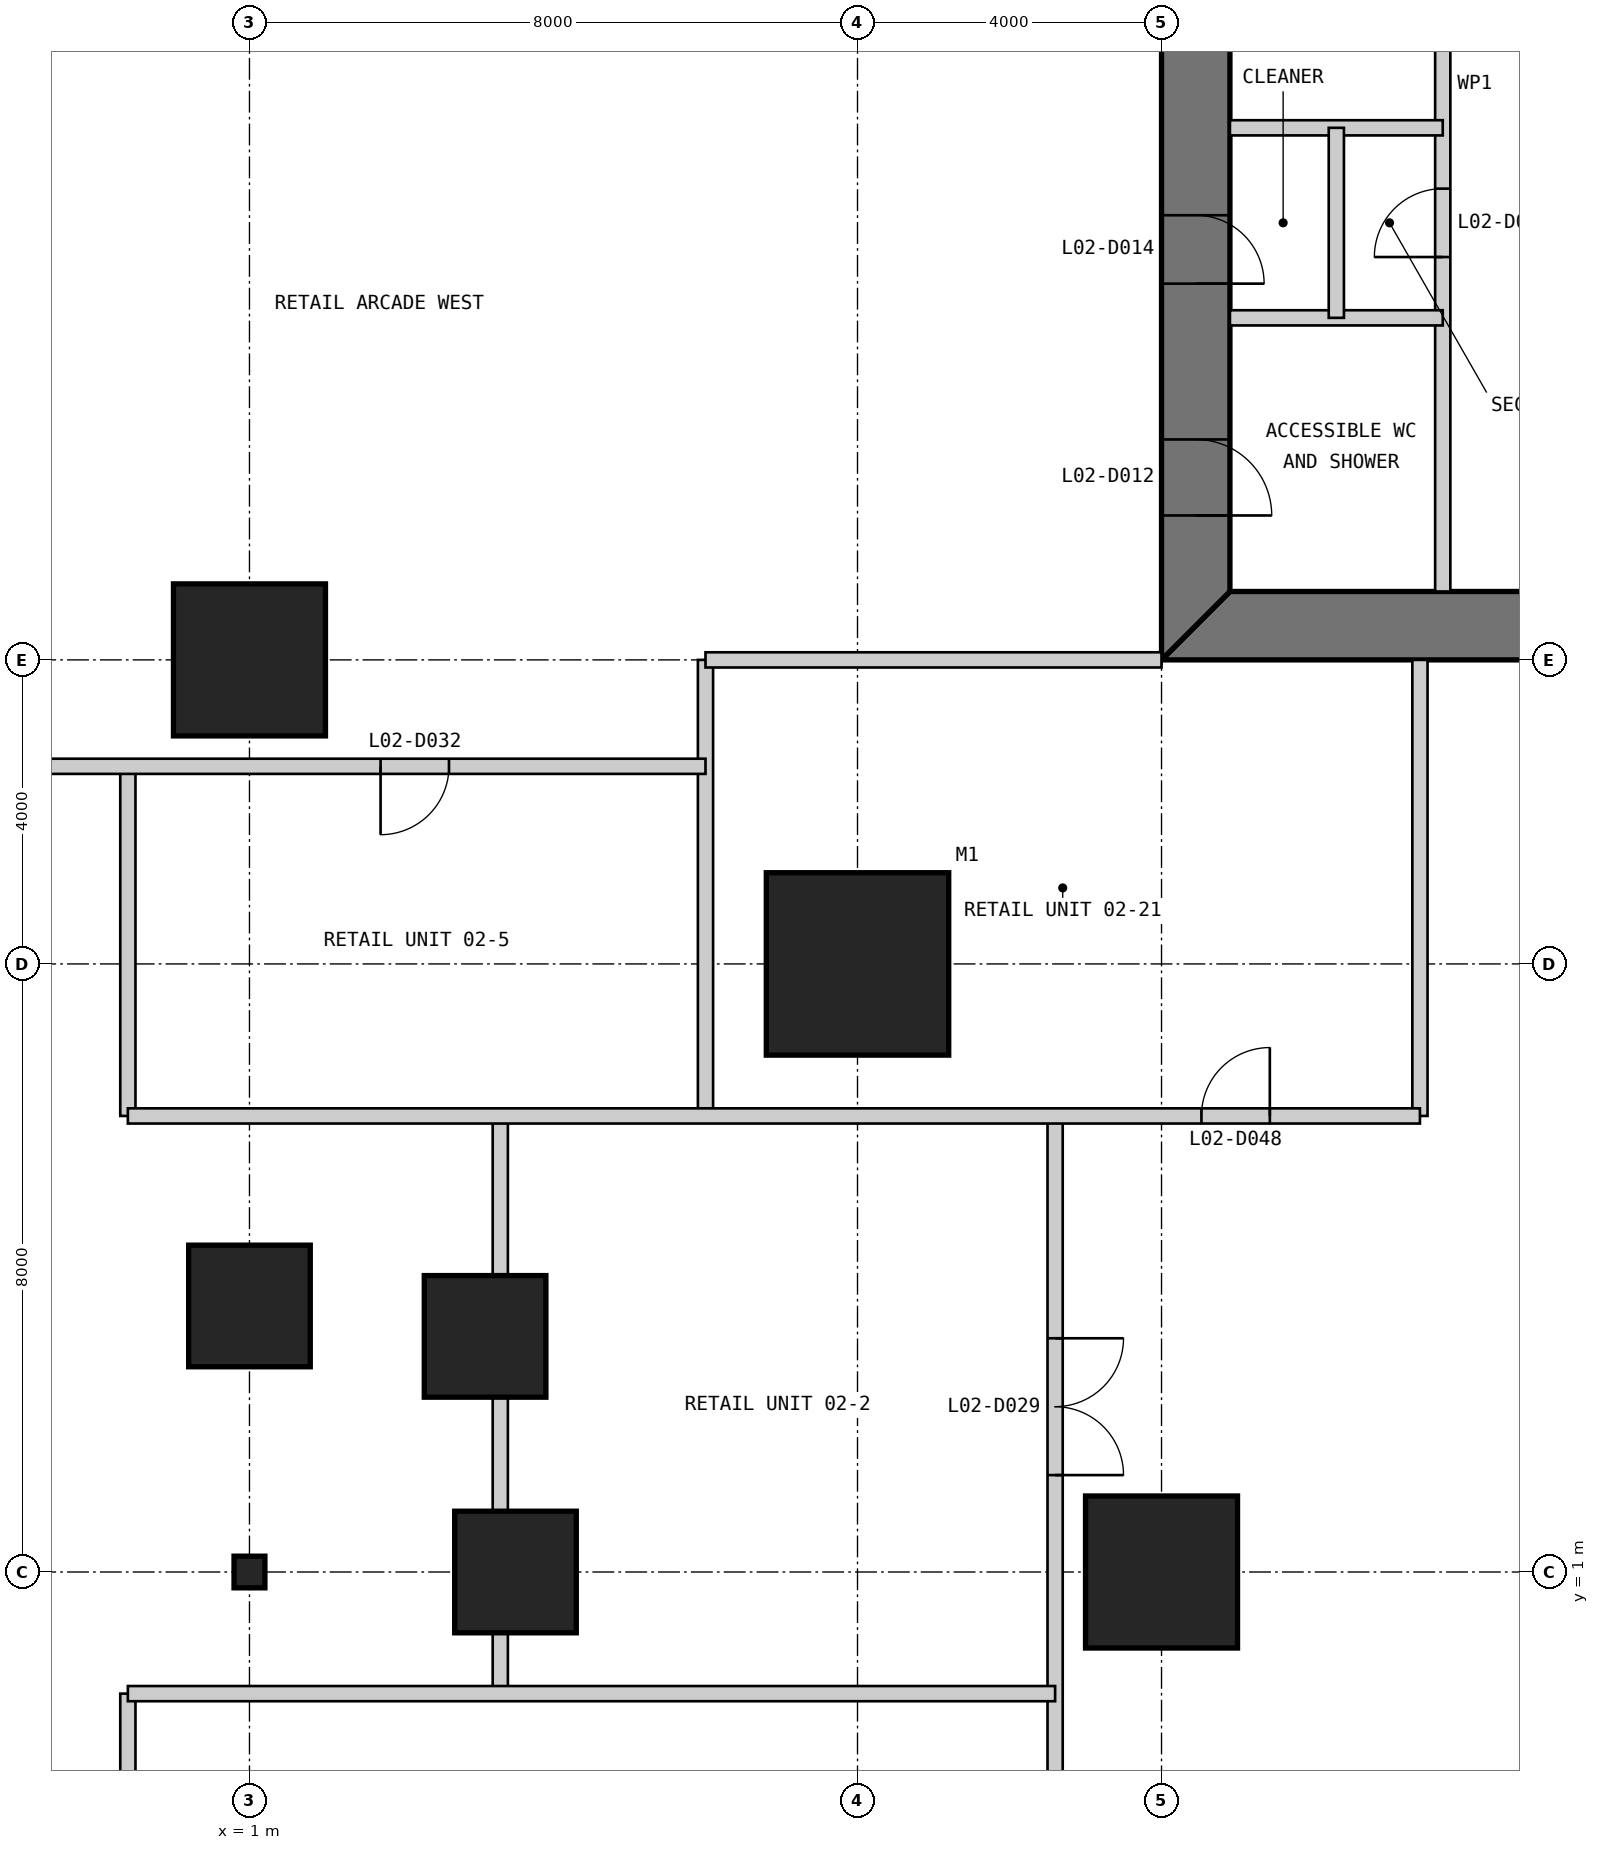
"""IFC4 building model, lengths in metres.
Left out: names, types, materials, properties, quantities, classifications, styles, units other than length and angle.
Written with IfcOpenShell. Run it as: python <this file> out.ifc"""

import sys

from ifc_helpers import new_model, si_unit, direction, frame, frame_2d, origin, origin_2d, place, context, subcontext, project, spatial, polyline, rectangle, i_section, outline, extrude, element, fill, save


model = new_model("IFC4")
c1 = context("Model", 3, precision=1e-05, world=origin(), true_north=direction((0.0, 1.0)))
c2 = subcontext(c1, "Body", "Model", "MODEL_VIEW")
j1 = project(units=[si_unit("LENGTHUNIT", "METRE"), si_unit("PLANEANGLEUNIT", "RADIAN")], contexts=[c1])
p1 = place(None, origin())
s1 = spatial("IfcSite", under=j1, at=p1, CompositionType="ELEMENT")
p2 = place(p1, origin())
s2 = spatial("IfcBuilding", under=s1, at=p2, CompositionType="ELEMENT")
p3 = place(p2, frame((0.0, 0.0, 11.8)))
s3 = spatial("IfcBuildingStorey", under=s2, at=p3, CompositionType="ELEMENT", Elevation=11.8)
p4 = place(p3, frame((9.0, 9.0, 0.0), z_axis=(0.0, 0.0, 1.0), x_axis=(1.0, 0.0, 0.0)))
e1 = element("IfcColumn", 1, at=p4, inside=s3, PredefinedType="COLUMN", context=c2, shape_type="SweptSolid", body=[
    extrude(rectangle(XDim=2.4, YDim=2.4, at=origin_2d()), origin(), (0.0, 0.0, 1.0), 4.8),
])
p5 = place(p3, frame((4.5, 1.0, 0.0), z_axis=(0.0, 0.0, 1.0), x_axis=(1.0, 0.0, 0.0)))
e2 = element("IfcColumn", 2, at=p5, inside=s3, PredefinedType="COLUMN", context=c2, shape_type="SweptSolid", body=[
    extrude(rectangle(XDim=1.6, YDim=1.6, at=origin_2d()), origin(), (0.0, 0.0, 1.0), 4.8),
])
for number, where, z_axis, x_axis in (
    (3, (13.0, 1.0, 0.0), (0.0, 0.0, 1.0), (1.0, 0.0, 0.0)),
    (4, (1.0, 13.0, 0.0), (0.0, 0.0, 1.0), (1.0, 0.0, 0.0)),
):
    element("IfcColumn", number, at=place(p3, frame(where, z_axis=z_axis, x_axis=x_axis)), inside=s3, PredefinedType="COLUMN", context=c2, shape_type="SweptSolid", body=[
        extrude(rectangle(XDim=2.0, YDim=2.0, at=origin_2d()), origin(), (0.0, 0.0, 1.0), 4.8),
    ])
for number, where, z_axis, x_axis in (
    (5, (1.0, 4.5, 0.0), (0.0, 0.0, 1.0), (1.0, 0.0, 0.0)),
    (6, (4.1, 4.1, 0.0), (0.0, 0.0, 1.0), (1.0, 0.0, 0.0)),
):
    element("IfcColumn", number, at=place(p3, frame(where, z_axis=z_axis, x_axis=x_axis)), inside=s3, PredefinedType="COLUMN", context=c2, shape_type="SweptSolid", body=[
        extrude(rectangle(XDim=1.6, YDim=1.6, at=origin_2d()), origin(), (0.0, 0.0, 1.0), 4.8),
    ])
p6 = place(p3, frame((1.0, 1.0, 0.0), z_axis=(0.0, 0.0, 1.0), x_axis=(1.0, 0.0, 0.0)))
e7 = element("IfcColumn", 7, at=p6, inside=s3, PredefinedType="COLUMN", context=c2, shape_type="SweptSolid", body=[
    extrude(i_section(OverallWidth=0.406, OverallDepth=0.417, WebThickness=0.03, FlangeThickness=0.048, at=origin_2d()), origin(), (0.0, 0.0, 1.0), 4.8),
])
p7 = place(p3, frame((13.0, 13.45, 0.0), z_axis=(0.0, 0.0, 1.0), x_axis=(1.0, 0.0, 0.0)))
e8 = element("IfcWall", 8, at=p7, inside=s3, PredefinedType="SHEAR", context=c2, shape_type="SweptSolid", body=[
    extrude(outline(polyline([(0.0, -0.45), (24.0, -0.45), (23.1, 0.45), (0.9, 0.45), (0.0, -0.45)])), origin(), (0.0, 0.0, 1.0), 4.8),
])
p8 = place(p7, frame((4.9, 0.0, 0.0)))
e9 = element("IfcOpeningElement", 9, at=p8, cuts=e8, PredefinedType="OPENING", context=c2, shape_type="SweptSolid", body=[
    extrude(rectangle(XDim=1.0, YDim=2.2, at=frame_2d((0.5, 1.1))), frame((0.0, 0.46, 0.0), z_axis=(0.0, -1.0, 0.0), x_axis=(1.0, 0.0, 0.0)), (0.0, 0.0, 1.0), 0.92),
])
p9 = place(p7, frame((8.9, 0.0, 0.0)))
e10 = element("IfcOpeningElement", 10, at=p9, cuts=e8, PredefinedType="OPENING", context=c2, shape_type="SweptSolid", body=[
    extrude(rectangle(XDim=1.1, YDim=2.2, at=frame_2d((0.55, 1.1))), frame((0.0, 0.46, 0.0), z_axis=(0.0, -1.0, 0.0), x_axis=(1.0, 0.0, 0.0)), (0.0, 0.0, 1.0), 0.92),
])
p10 = place(p7, frame((15.05, 0.0, 0.0)))
e11 = element("IfcOpeningElement", 11, at=p10, cuts=e8, PredefinedType="OPENING", context=c2, shape_type="SweptSolid", body=[
    extrude(rectangle(XDim=0.9, YDim=2.2, at=frame_2d((0.45, 1.1))), frame((0.0, 0.46, 0.0), z_axis=(0.0, -1.0, 0.0), x_axis=(1.0, 0.0, 0.0)), (0.0, 0.0, 1.0), 0.92),
])
p11 = place(p7, frame((17.9, 0.0, 0.0)))
e12 = element("IfcOpeningElement", 12, at=p11, cuts=e8, PredefinedType="OPENING", context=c2, shape_type="SweptSolid", body=[
    extrude(rectangle(XDim=1.0, YDim=2.2, at=frame_2d((0.5, 1.1))), frame((0.0, 0.46, 0.0), z_axis=(0.0, -1.0, 0.0), x_axis=(1.0, 0.0, 0.0)), (0.0, 0.0, 1.0), 0.92),
])
p12 = place(p7, frame((21.4, 0.0, 0.0)))
e13 = element("IfcOpeningElement", 13, at=p12, cuts=e8, PredefinedType="OPENING", context=c2, shape_type="SweptSolid", body=[
    extrude(rectangle(XDim=1.0, YDim=2.2, at=frame_2d((0.5, 1.1))), frame((0.0, 0.46, 0.0), z_axis=(0.0, -1.0, 0.0), x_axis=(1.0, 0.0, 0.0)), (0.0, 0.0, 1.0), 0.92),
])
p13 = place(p3, frame((13.45, 36.1, 0.0), z_axis=(0.0, 0.0, 1.0), x_axis=(0.0, -1.0, 0.0)))
e14 = element("IfcWall", 14, at=p13, inside=s3, PredefinedType="SHEAR", context=c2, shape_type="SweptSolid", body=[
    extrude(outline(polyline([(-0.9, -0.45), (23.1, -0.45), (22.2, 0.45), (0.0, 0.45), (-0.9, -0.45)])), origin(), (0.0, 0.0, 1.0), 4.8),
])
p14 = place(p13, frame((20.2, 0.0, 0.0)))
e15 = element("IfcOpeningElement", 15, at=p14, cuts=e14, PredefinedType="OPENING", context=c2, shape_type="SweptSolid", body=[
    extrude(rectangle(XDim=1.0, YDim=2.2, at=frame_2d((0.5, 1.1))), frame((0.0, 0.46, 0.0), z_axis=(0.0, -1.0, 0.0), x_axis=(1.0, 0.0, 0.0)), (0.0, 0.0, 1.0), 0.92),
])
p15 = place(p13, frame((17.25, 0.0, 0.0)))
e16 = element("IfcOpeningElement", 16, at=p15, cuts=e14, PredefinedType="OPENING", context=c2, shape_type="SweptSolid", body=[
    extrude(rectangle(XDim=0.9, YDim=2.2, at=frame_2d((0.45, 1.1))), frame((0.0, 0.46, 0.0), z_axis=(0.0, -1.0, 0.0), x_axis=(1.0, 0.0, 0.0)), (0.0, 0.0, 1.0), 0.92),
])
p16 = place(p3, frame((16.7, 13.9, 0.0), z_axis=(0.0, 0.0, 1.0), x_axis=(0.0, 1.0, 0.0)))
e17 = element("IfcWall", 17, at=p16, inside=s3, PredefinedType="PARTITIONING", context=c2, shape_type="SweptSolid", body=[
    extrude(rectangle(XDim=16.1, YDim=0.2, at=frame_2d((8.05, 0.0))), origin(), (0.0, 0.0, 1.0), 4.6),
])
p17 = place(p16, frame((4.4, 0.0, 0.0)))
e18 = element("IfcOpeningElement", 18, at=p17, cuts=e17, PredefinedType="OPENING", context=c2, shape_type="SweptSolid", body=[
    extrude(rectangle(XDim=0.9, YDim=2.2, at=frame_2d((0.45, 1.1))), frame((0.0, 0.11, 0.0), z_axis=(0.0, -1.0, 0.0), x_axis=(1.0, 0.0, 0.0)), (0.0, 0.0, 1.0), 0.22),
])
for number, where, z_axis, x_axis in (
    (19, (13.9, 20.0, 0.0), (0.0, 0.0, 1.0), (1.0, 0.0, 0.0)),
    (20, (13.9, 17.5, 0.0), (0.0, 0.0, 1.0), (1.0, 0.0, 0.0)),
):
    element("IfcWall", number, at=place(p3, frame(where, z_axis=z_axis, x_axis=x_axis)), inside=s3, PredefinedType="PARTITIONING", context=c2, shape_type="SweptSolid", body=[
        extrude(rectangle(XDim=2.8, YDim=0.2, at=frame_2d((1.4, 0.0))), origin(), (0.0, 0.0, 1.0), 4.6),
    ])
p18 = place(p3, frame((15.3, 17.5, 0.0), z_axis=(0.0, 0.0, 1.0), x_axis=(0.0, 1.0, 0.0)))
e21 = element("IfcWall", 21, at=p18, inside=s3, PredefinedType="PARTITIONING", context=c2, shape_type="SweptSolid", body=[
    extrude(rectangle(XDim=2.5, YDim=0.2, at=frame_2d((1.25, 0.0))), origin(), (0.0, 0.0, 1.0), 4.6),
])
p19 = place(p3, frame((-0.6, -7.25, 0.0), z_axis=(0.0, 0.0, 1.0), x_axis=(0.0, 1.0, 0.0)))
e22 = element("IfcWall", 22, at=p19, inside=s3, PredefinedType="PARTITIONING", context=c2, shape_type="SweptSolid", body=[
    extrude(rectangle(XDim=6.65, YDim=0.2, at=frame_2d((3.325, 0.0))), origin(), (0.0, 0.0, 1.0), 4.5),
])
p20 = place(p3, frame((-0.6, 7.0, 0.0), z_axis=(0.0, 0.0, 1.0), x_axis=(0.0, 1.0, 0.0)))
e23 = element("IfcWall", 23, at=p20, inside=s3, PredefinedType="PARTITIONING", context=c2, shape_type="SweptSolid", body=[
    extrude(rectangle(XDim=4.6, YDim=0.2, at=frame_2d((2.3, 0.0))), origin(), (0.0, 0.0, 1.0), 4.5),
])
p21 = place(p3, frame((4.3, -0.6, 0.0), z_axis=(0.0, 0.0, 1.0), x_axis=(0.0, 1.0, 0.0)))
e24 = element("IfcWall", 24, at=p21, inside=s3, PredefinedType="PARTITIONING", context=c2, shape_type="SweptSolid", body=[
    extrude(rectangle(XDim=0.8, YDim=0.2, at=frame_2d((0.4, 0.0))), origin(), (0.0, 0.0, 1.0), 4.5),
])
p22 = place(p3, frame((4.3, 1.8, 0.0), z_axis=(0.0, 0.0, 1.0), x_axis=(0.0, 1.0, 0.0)))
e25 = element("IfcWall", 25, at=p22, inside=s3, PredefinedType="PARTITIONING", context=c2, shape_type="SweptSolid", body=[
    extrude(rectangle(XDim=1.5, YDim=0.2, at=frame_2d((0.75, 0.0))), origin(), (0.0, 0.0, 1.0), 3.65),
])
p23 = place(p3, frame((4.3, 4.9, 0.0), z_axis=(0.0, 0.0, 1.0), x_axis=(0.0, 1.0, 0.0)))
e26 = element("IfcWall", 26, at=p23, inside=s3, PredefinedType="PARTITIONING", context=c2, shape_type="SweptSolid", body=[
    extrude(rectangle(XDim=2.1, YDim=0.2, at=frame_2d((1.05, 0.0))), origin(), (0.0, 0.0, 1.0), 4.5),
])
p24 = place(p3, frame((7.0, 7.0, 0.0), z_axis=(0.0, 0.0, 1.0), x_axis=(0.0, 1.0, 0.0)))
e27 = element("IfcWall", 27, at=p24, inside=s3, PredefinedType="PARTITIONING", context=c2, shape_type="SweptSolid", body=[
    extrude(rectangle(XDim=6.0, YDim=0.2, at=frame_2d((3.0, 0.0))), origin(), (0.0, 0.0, 1.0), 4.5),
])
p25 = place(p3, frame((11.6, -7.25, 0.0), z_axis=(0.0, 0.0, 1.0), x_axis=(0.0, 1.0, 0.0)))
e28 = element("IfcWall", 28, at=p25, inside=s3, PredefinedType="PARTITIONING", context=c2, shape_type="SweptSolid", body=[
    extrude(rectangle(XDim=14.25, YDim=0.2, at=frame_2d((7.125, 0.0))), origin(), (0.0, 0.0, 1.0), 4.5),
])
p26 = place(p25, frame((2.45, 0.0, 0.0)))
e29 = element("IfcOpeningElement", 29, at=p26, cuts=e28, PredefinedType="OPENING", context=c2, shape_type="SweptSolid", body=[
    extrude(rectangle(XDim=1.8, YDim=2.4, at=frame_2d((0.9, 1.2))), frame((0.0, 0.11, 0.0), z_axis=(0.0, -1.0, 0.0), x_axis=(1.0, 0.0, 0.0)), (0.0, 0.0, 1.0), 0.22),
])
p27 = place(p25, frame((9.525, 0.0, 0.0)))
e30 = element("IfcOpeningElement", 30, at=p27, cuts=e28, PredefinedType="OPENING", context=c2, shape_type="SweptSolid", body=[
    extrude(rectangle(XDim=1.8, YDim=2.4, at=frame_2d((0.9, 1.2))), frame((0.0, 0.11, 0.0), z_axis=(0.0, -1.0, 0.0), x_axis=(1.0, 0.0, 0.0)), (0.0, 0.0, 1.0), 0.22),
])
p28 = place(p3, frame((16.4, 7.0, 0.0), z_axis=(0.0, 0.0, 1.0), x_axis=(0.0, 1.0, 0.0)))
e31 = element("IfcWall", 31, at=p28, inside=s3, PredefinedType="PARTITIONING", context=c2, shape_type="SweptSolid", body=[
    extrude(rectangle(XDim=6.0, YDim=0.2, at=frame_2d((3.0, 0.0))), origin(), (0.0, 0.0, 1.0), 4.5),
])
p29 = place(p3, frame((-0.6, -0.6, 0.0), z_axis=(0.0, 0.0, 1.0), x_axis=(1.0, 0.0, 0.0)))
e32 = element("IfcWall", 32, at=p29, inside=s3, PredefinedType="PARTITIONING", context=c2, shape_type="SweptSolid", body=[
    extrude(rectangle(XDim=12.2, YDim=0.2, at=frame_2d((6.1, 0.0))), origin(), (0.0, 0.0, 1.0), 4.5),
])
p30 = place(p3, frame((-0.6, 7.0, 0.0), z_axis=(0.0, 0.0, 1.0), x_axis=(1.0, 0.0, 0.0)))
e33 = element("IfcWall", 33, at=p30, inside=s3, PredefinedType="PARTITIONING", context=c2, shape_type="SweptSolid", body=[
    extrude(rectangle(XDim=17.0, YDim=0.2, at=frame_2d((8.5, 0.0))), origin(), (0.0, 0.0, 1.0), 4.5),
])
p31 = place(p30, frame((14.125, 0.0, 0.0)))
e34 = element("IfcOpeningElement", 34, at=p31, cuts=e33, PredefinedType="OPENING", context=c2, shape_type="SweptSolid", body=[
    extrude(rectangle(XDim=0.9, YDim=2.2, at=frame_2d((0.45, 1.1))), frame((0.0, 0.11, 0.0), z_axis=(0.0, -1.0, 0.0), x_axis=(1.0, 0.0, 0.0)), (0.0, 0.0, 1.0), 0.22),
])
p32 = place(p3, frame((-15.25, 11.6, 0.0), z_axis=(0.0, 0.0, 1.0), x_axis=(1.0, 0.0, 0.0)))
e35 = element("IfcWall", 35, at=p32, inside=s3, PredefinedType="PARTITIONING", context=c2, shape_type="SweptSolid", body=[
    extrude(rectangle(XDim=22.25, YDim=0.2, at=frame_2d((11.125, 0.0))), origin(), (0.0, 0.0, 1.0), 4.5),
])
p33 = place(p32, frame((10.325, 0.0, 0.0)))
e36 = element("IfcOpeningElement", 36, at=p33, cuts=e35, PredefinedType="OPENING", context=c2, shape_type="SweptSolid", body=[
    extrude(rectangle(XDim=1.8, YDim=2.4, at=frame_2d((0.9, 1.2))), frame((0.0, 0.11, 0.0), z_axis=(0.0, -1.0, 0.0), x_axis=(1.0, 0.0, 0.0)), (0.0, 0.0, 1.0), 0.22),
])
p34 = place(p32, frame((3.025, 0.0, 0.0)))
e37 = element("IfcOpeningElement", 37, at=p34, cuts=e35, PredefinedType="OPENING", context=c2, shape_type="SweptSolid", body=[
    extrude(rectangle(XDim=1.8, YDim=2.4, at=frame_2d((0.9, 1.2))), frame((0.0, 0.11, 0.0), z_axis=(0.0, -1.0, 0.0), x_axis=(1.0, 0.0, 0.0)), (0.0, 0.0, 1.0), 0.22),
])
p35 = place(p32, frame((17.975, 0.0, 0.0)))
e38 = element("IfcOpeningElement", 38, at=p35, cuts=e35, PredefinedType="OPENING", context=c2, shape_type="SweptSolid", body=[
    extrude(rectangle(XDim=0.9, YDim=2.2, at=frame_2d((0.45, 1.1))), frame((0.0, 0.11, 0.0), z_axis=(0.0, -1.0, 0.0), x_axis=(1.0, 0.0, 0.0)), (0.0, 0.0, 1.0), 0.22),
])
p36 = place(p3, frame((7.0, 13.0, 0.0), z_axis=(0.0, 0.0, 1.0), x_axis=(1.0, 0.0, 0.0)))
e39 = element("IfcWall", 39, at=p36, inside=s3, PredefinedType="PARTITIONING", context=c2, shape_type="SweptSolid", body=[
    extrude(rectangle(XDim=6.0, YDim=0.2, at=frame_2d((3.0, 0.0))), origin(), (0.0, 0.0, 1.0), 3.653),
])
p37 = place(p14, origin())
e40 = element("IfcDoor", 40, at=p37, inside=s3, OperationType="SINGLE_SWING_RIGHT", PredefinedType="DOOR", context=c2, shape_type="SweptSolid", body=[
    extrude(rectangle(XDim=1.0, YDim=2.2, at=frame_2d((0.5, 1.1))), frame((0.0, 0.025, 0.0), z_axis=(0.0, -1.0, 0.0), x_axis=(1.0, 0.0, 0.0)), (0.0, 0.0, 1.0), 0.05),
    extrude(outline(polyline([(0.0, 0.0), (0.04, 0.0), (0.04, 2.16), (0.96, 2.16), (0.96, 0.0), (1.0, 0.0), (1.0, 2.2), (0.0, 2.2), (0.0, 0.0)])), frame((0.0, 0.3, 0.0), z_axis=(0.0, -1.0, 0.0), x_axis=(1.0, 0.0, 0.0)), (0.0, 0.0, 1.0), 0.6),
])
fill(e15, e40)
p38 = place(p17, origin())
e41 = element("IfcDoor", 41, at=p38, inside=s3, OperationType="SINGLE_SWING_LEFT", PredefinedType="DOOR", context=c2, shape_type="SweptSolid", body=[
    extrude(rectangle(XDim=0.9, YDim=2.2, at=frame_2d((0.45, 1.1))), frame((0.0, 0.025, 0.0), z_axis=(0.0, -1.0, 0.0), x_axis=(1.0, 0.0, 0.0)), (0.0, 0.0, 1.0), 0.05),
])
fill(e18, e41)
p39 = place(p15, origin())
e42 = element("IfcDoor", 42, at=p39, inside=s3, OperationType="SINGLE_SWING_RIGHT", PredefinedType="DOOR", context=c2, shape_type="SweptSolid", body=[
    extrude(rectangle(XDim=0.9, YDim=2.2, at=frame_2d((0.45, 1.1))), frame((0.0, 0.025, 0.0), z_axis=(0.0, -1.0, 0.0), x_axis=(1.0, 0.0, 0.0)), (0.0, 0.0, 1.0), 0.05),
    extrude(outline(polyline([(0.0, 0.0), (0.04, 0.0), (0.04, 2.16), (0.86, 2.16), (0.86, 0.0), (0.9, 0.0), (0.9, 2.2), (0.0, 2.2), (0.0, 0.0)])), frame((0.0, 0.3, 0.0), z_axis=(0.0, -1.0, 0.0), x_axis=(1.0, 0.0, 0.0)), (0.0, 0.0, 1.0), 0.6),
])
fill(e16, e42)
p40 = place(p27, frame((1.8, 0.0, 0.0), z_axis=(0.0, 0.0, 1.0), x_axis=(-1.0, 0.0, 0.0)))
e43 = element("IfcDoor", 43, at=p40, inside=s3, OperationType="DOUBLE_DOOR_SINGLE_SWING", PredefinedType="DOOR", context=c2, shape_type="SweptSolid", body=[
    extrude(rectangle(XDim=1.8, YDim=2.4, at=frame_2d((0.9, 1.2))), frame((0.0, 0.025, 0.0), z_axis=(0.0, -1.0, 0.0), x_axis=(1.0, 0.0, 0.0)), (0.0, 0.0, 1.0), 0.05),
])
fill(e30, e43)
p41 = place(p35, frame((0.9, 0.0, 0.0), z_axis=(0.0, 0.0, 1.0), x_axis=(-1.0, 0.0, 0.0)))
e44 = element("IfcDoor", 44, at=p41, inside=s3, OperationType="SINGLE_SWING_RIGHT", PredefinedType="DOOR", context=c2, shape_type="SweptSolid", body=[
    extrude(rectangle(XDim=0.9, YDim=2.2, at=frame_2d((0.45, 1.1))), frame((0.0, 0.025, 0.0), z_axis=(0.0, -1.0, 0.0), x_axis=(1.0, 0.0, 0.0)), (0.0, 0.0, 1.0), 0.05),
])
fill(e38, e44)
p42 = place(p31, origin())
e45 = element("IfcDoor", 45, at=p42, inside=s3, OperationType="SINGLE_SWING_RIGHT", PredefinedType="DOOR", context=c2, shape_type="SweptSolid", body=[
    extrude(rectangle(XDim=0.9, YDim=2.2, at=frame_2d((0.45, 1.1))), frame((0.0, 0.025, 0.0), z_axis=(0.0, -1.0, 0.0), x_axis=(1.0, 0.0, 0.0)), (0.0, 0.0, 1.0), 0.05),
])
fill(e34, e45)
save(model, sys.argv[1])
